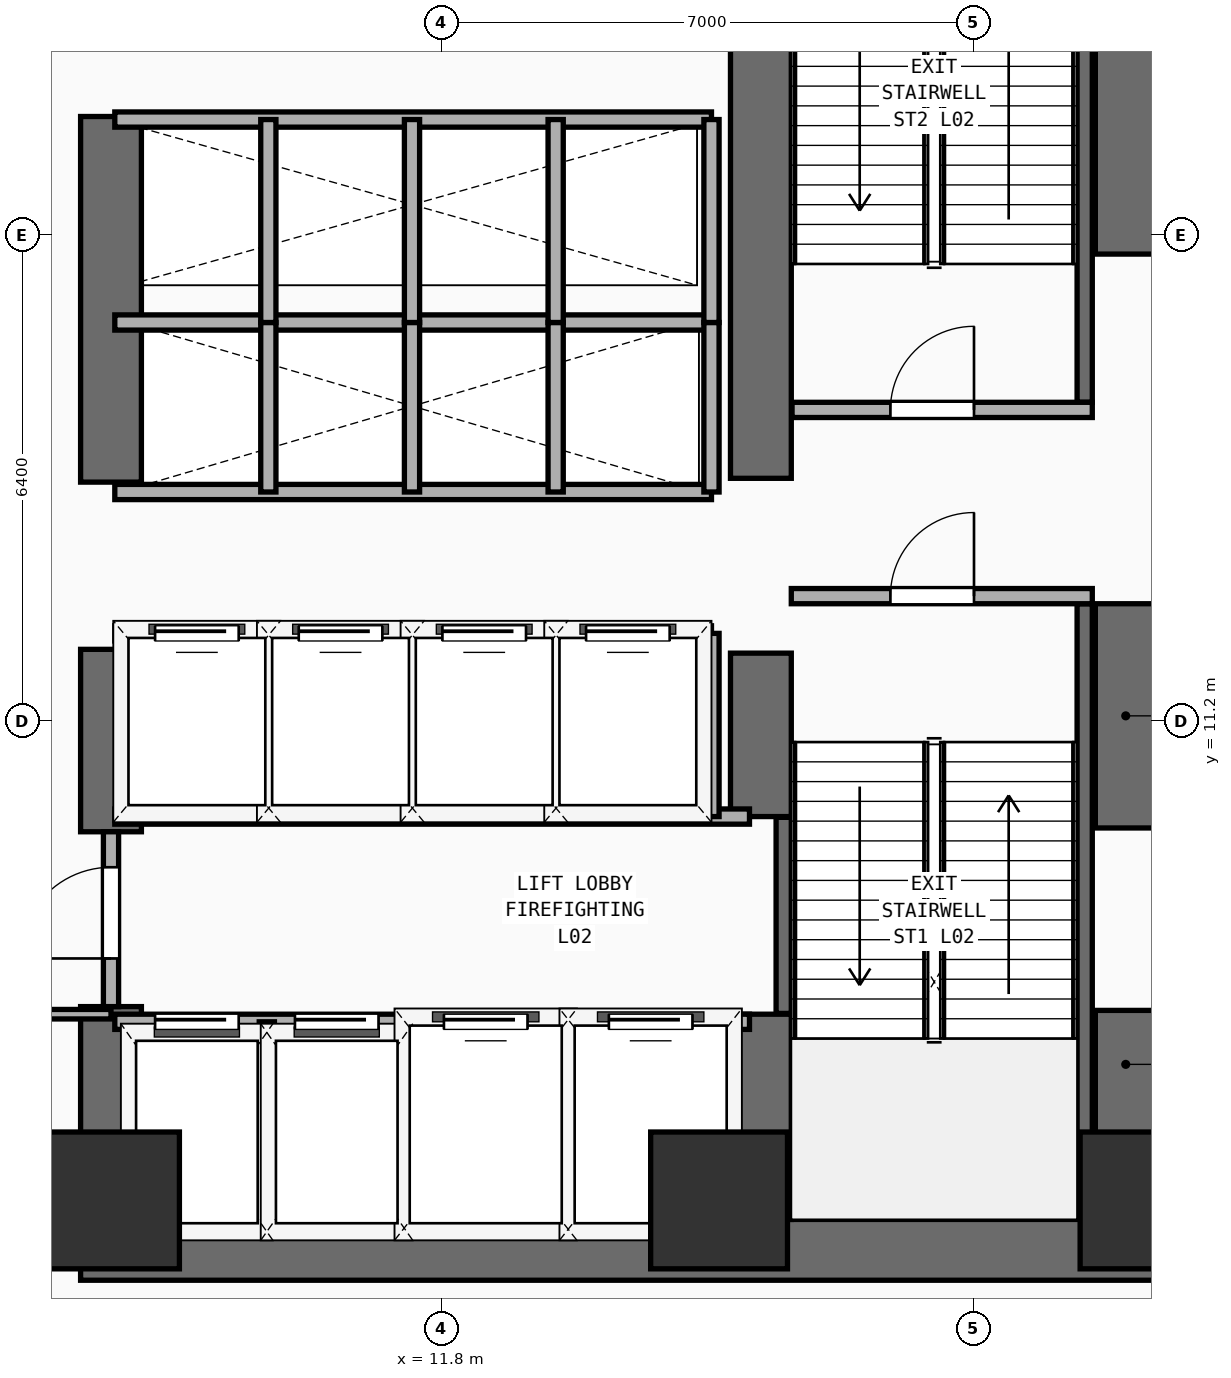
"""IFC4 building model, lengths in metres.
Left out: names, types, materials, properties, quantities, classifications, styles, units other than length and angle.
Written with IfcOpenShell. Run it as: python <this file> out.ifc"""

import sys

from ifc_helpers import new_model, si_unit, direction, frame, frame_2d, origin, origin_2d, place, context, subcontext, project, spatial, rectangle, extrude, element, fill, save


model = new_model("IFC4")
c1 = context("Model", 3, precision=1e-05, world=origin(), true_north=direction((0.0, 1.0)))
c2 = subcontext(c1, "Body", "Model", "MODEL_VIEW")
j1 = project(units=[si_unit("LENGTHUNIT", "METRE"), si_unit("PLANEANGLEUNIT", "RADIAN")], contexts=[c1])
p1 = place(None, origin())
s1 = spatial("IfcSite", under=j1, at=p1, CompositionType="ELEMENT")
p2 = place(p1, origin())
s2 = spatial("IfcBuilding", under=s1, at=p2, CompositionType="ELEMENT")
p3 = place(p2, frame((0.0, 0.0, 5.6)))
s3 = spatial("IfcBuildingStorey", under=s2, at=p3, CompositionType="ELEMENT", Elevation=5.6)
p4 = place(p3, frame((7.05, 4.25, 0.0), z_axis=(0.0, 0.0, 1.0), x_axis=(1.0, 0.0, 0.0)))
e1 = element("IfcWall", 1, at=p4, inside=s3, PredefinedType="SHEAR", context=c2, shape_type="SweptSolid", body=[
    extrude(rectangle(XDim=14.15, YDim=0.8, at=frame_2d((7.075, 0.0))), origin(), (0.0, 0.0, 1.0), 4.46),
])
p5 = place(p3, frame((7.45, 4.65, 0.0), z_axis=(0.0, 0.0, 1.0), x_axis=(0.0, 1.0, 0.0)))
e2 = element("IfcWall", 2, at=p5, inside=s3, PredefinedType="SHEAR", context=c2, shape_type="SweptSolid", body=[
    extrude(rectangle(XDim=2.8, YDim=0.8, at=frame_2d((1.4, 0.0))), origin(), (0.0, 0.0, 1.0), 4.46),
])
p6 = place(p3, frame((7.45, 9.75, 0.0), z_axis=(0.0, 0.0, 1.0), x_axis=(0.0, 1.0, 0.0)))
e3 = element("IfcWall", 3, at=p6, inside=s3, PredefinedType="SHEAR", context=c2, shape_type="SweptSolid", body=[
    extrude(rectangle(XDim=2.4, YDim=0.8, at=frame_2d((1.2, 0.0))), origin(), (0.0, 0.0, 1.0), 4.46),
])
p7 = place(p3, frame((7.45, 14.35, 0.0), z_axis=(0.0, 0.0, 1.0), x_axis=(0.0, 1.0, 0.0)))
e4 = element("IfcWall", 4, at=p7, inside=s3, PredefinedType="SHEAR", context=c2, shape_type="SweptSolid", body=[
    extrude(rectangle(XDim=4.81, YDim=0.8, at=frame_2d((2.405, 0.0))), origin(), (0.0, 0.0, 1.0), 4.46),
])
p8 = place(p3, frame((20.8, 4.65, 0.0), z_axis=(0.0, 0.0, 1.0), x_axis=(0.0, 1.0, 0.0)))
e5 = element("IfcWall", 5, at=p8, inside=s3, PredefinedType="SHEAR", context=c2, shape_type="SweptSolid", body=[
    extrude(rectangle(XDim=2.75, YDim=0.8, at=frame_2d((1.375, 0.0))), origin(), (0.0, 0.0, 1.0), 4.46),
])
p9 = place(p3, frame((20.8, 9.8, 0.0), z_axis=(0.0, 0.0, 1.0), x_axis=(0.0, 1.0, 0.0)))
e6 = element("IfcWall", 6, at=p9, inside=s3, PredefinedType="SHEAR", context=c2, shape_type="SweptSolid", body=[
    extrude(rectangle(XDim=2.95, YDim=0.8, at=frame_2d((1.475, 0.0))), origin(), (0.0, 0.0, 1.0), 4.46),
])
p10 = place(p3, frame((20.8, 17.35, 0.0), z_axis=(0.0, 0.0, 1.0), x_axis=(0.0, 1.0, 0.0)))
e7 = element("IfcWall", 7, at=p10, inside=s3, PredefinedType="SHEAR", context=c2, shape_type="SweptSolid", body=[
    extrude(rectangle(XDim=6.15, YDim=0.8, at=frame_2d((3.075, 0.0))), origin(), (0.0, 0.0, 1.0), 4.46),
])
p11 = place(p3, frame((16.0, 4.65, 0.0), z_axis=(0.0, 0.0, 1.0), x_axis=(0.0, 1.0, 0.0)))
e8 = element("IfcWall", 8, at=p11, inside=s3, PredefinedType="SHEAR", context=c2, shape_type="SweptSolid", body=[
    extrude(rectangle(XDim=2.7, YDim=0.8, at=frame_2d((1.35, 0.0))), origin(), (0.0, 0.0, 1.0), 4.46),
])
p12 = place(p3, frame((16.0, 9.95, 0.0), z_axis=(0.0, 0.0, 1.0), x_axis=(0.0, 1.0, 0.0)))
e9 = element("IfcWall", 9, at=p12, inside=s3, PredefinedType="SHEAR", context=c2, shape_type="SweptSolid", body=[
    extrude(rectangle(XDim=2.15, YDim=0.8, at=frame_2d((1.075, 0.0))), origin(), (0.0, 0.0, 1.0), 4.46),
])
p13 = place(p3, frame((16.0, 14.4, 0.0), z_axis=(0.0, 0.0, 1.0), x_axis=(0.0, 1.0, 0.0)))
e10 = element("IfcWall", 10, at=p13, inside=s3, PredefinedType="SHEAR", context=c2, shape_type="SweptSolid", body=[
    extrude(rectangle(XDim=9.1, YDim=0.8, at=frame_2d((4.55, 0.0))), origin(), (0.0, 0.0, 1.0), 4.46),
])
for number, where, z_axis, x_axis in (
    (11, (7.45, 4.9, 0.0), (0.0, 0.0, 1.0), (1.0, 0.0, 0.0)),
    (12, (15.45, 4.9, 0.0), (0.0, 0.0, 1.0), (1.0, 0.0, 0.0)),
    (13, (21.1, 4.9, 0.0), (0.0, 0.0, 1.0), (1.0, 0.0, 0.0)),
):
    element("IfcColumn", number, at=place(p3, frame(where, z_axis=z_axis, x_axis=x_axis)), inside=s3, PredefinedType="COLUMN", context=c2, shape_type="SweptSolid", body=[
        extrude(rectangle(XDim=1.8, YDim=1.8, at=origin_2d()), origin(), (0.0, 0.0, 1.0), 4.46),
    ])
p14 = place(p3, frame((16.3, 7.36, 0.0), z_axis=(0.0, 0.0, 1.0), x_axis=(0.0, 1.0, 0.0)))
e14 = element("IfcWall", 14, at=p14, inside=s3, PredefinedType="SHEAR", context=c2, shape_type="SweptSolid", body=[
    extrude(rectangle(XDim=2.58, YDim=0.2, at=frame_2d((1.29, 0.0))), origin(), (0.0, 0.0, 1.0), 4.46),
])
p15 = place(p3, frame((20.26, 4.66, 0.0), z_axis=(0.0, 0.0, 1.0), x_axis=(0.0, 1.0, 0.0)))
e15 = element("IfcWall", 15, at=p15, inside=s3, PredefinedType="SHEAR", context=c2, shape_type="SweptSolid", body=[
    extrude(rectangle(XDim=8.09, YDim=0.2, at=frame_2d((4.045, 0.0))), origin(), (0.0, 0.0, 1.0), 4.46),
])
p16 = place(p3, frame((16.4, 12.85, 0.0), z_axis=(0.0, 0.0, 1.0), x_axis=(1.0, 0.0, 0.0)))
e16 = element("IfcWall", 16, at=p16, inside=s3, PredefinedType="PARTITIONING", context=c2, shape_type="SweptSolid", body=[
    extrude(rectangle(XDim=3.96, YDim=0.2, at=frame_2d((1.98, 0.0))), origin(), (0.0, 0.0, 1.0), 4.46),
])
p17 = place(p16, frame((1.304, 0.0, 0.0)))
e17 = element("IfcOpeningElement", 17, at=p17, cuts=e16, PredefinedType="OPENING", context=c2, shape_type="SweptSolid", body=[
    extrude(rectangle(XDim=1.1, YDim=2.2, at=frame_2d((0.55, 1.1))), frame((0.0, 0.11, 0.0), z_axis=(0.0, -1.0, 0.0), x_axis=(1.0, 0.0, 0.0)), (0.0, 0.0, 1.0), 0.22),
])
p18 = place(p3, frame((20.26, 15.4, 0.0), z_axis=(0.0, 0.0, 1.0), x_axis=(0.0, 1.0, 0.0)))
e18 = element("IfcWall", 18, at=p18, inside=s3, PredefinedType="SHEAR", context=c2, shape_type="SweptSolid", body=[
    extrude(rectangle(XDim=8.09, YDim=0.2, at=frame_2d((4.045, 0.0))), origin(), (0.0, 0.0, 1.0), 4.46),
])
p19 = place(p3, frame((16.41, 15.3, 0.0), z_axis=(0.0, 0.0, 1.0), x_axis=(1.0, 0.0, 0.0)))
e19 = element("IfcWall", 19, at=p19, inside=s3, PredefinedType="PARTITIONING", context=c2, shape_type="SweptSolid", body=[
    extrude(rectangle(XDim=3.95, YDim=0.2, at=frame_2d((1.975, 0.0))), origin(), (0.0, 0.0, 1.0), 4.46),
])
p20 = place(p19, frame((1.294, 0.0, 0.0)))
e20 = element("IfcOpeningElement", 20, at=p20, cuts=e19, PredefinedType="OPENING", context=c2, shape_type="SweptSolid", body=[
    extrude(rectangle(XDim=1.1, YDim=2.2, at=frame_2d((0.55, 1.1))), frame((0.0, 0.11, 0.0), z_axis=(0.0, -1.0, 0.0), x_axis=(1.0, 0.0, 0.0)), (0.0, 0.0, 1.0), 0.22),
])
p21 = place(p3, frame((7.5, 7.25, 0.0), z_axis=(0.0, 0.0, 1.0), x_axis=(1.0, 0.0, 0.0)))
e21 = element("IfcWall", 21, at=p21, inside=s3, PredefinedType="PARTITIONING", context=c2, shape_type="SweptSolid", body=[
    extrude(rectangle(XDim=8.35, YDim=0.2, at=frame_2d((4.175, 0.0))), origin(), (0.0, 0.0, 1.0), 4.46),
])
p22 = place(p21, frame((0.53, 0.0, 0.0)))
e22 = element("IfcOpeningElement", 22, at=p22, cuts=e21, PredefinedType="OPENING", context=c2, shape_type="SweptSolid", body=[
    extrude(rectangle(XDim=1.1, YDim=2.2, at=frame_2d((0.55, 1.1))), frame((0.0, 0.11, 0.0), z_axis=(0.0, -1.0, 0.0), x_axis=(1.0, 0.0, 0.0)), (0.0, 0.0, 1.0), 0.22),
])
p23 = place(p21, frame((2.37, 0.0, 0.0)))
e23 = element("IfcOpeningElement", 23, at=p23, cuts=e21, PredefinedType="OPENING", context=c2, shape_type="SweptSolid", body=[
    extrude(rectangle(XDim=1.1, YDim=2.2, at=frame_2d((0.55, 1.1))), frame((0.0, 0.11, 0.0), z_axis=(0.0, -1.0, 0.0), x_axis=(1.0, 0.0, 0.0)), (0.0, 0.0, 1.0), 0.22),
])
p24 = place(p21, frame((4.33, 0.0, 0.0)))
e24 = element("IfcOpeningElement", 24, at=p24, cuts=e21, PredefinedType="OPENING", context=c2, shape_type="SweptSolid", body=[
    extrude(rectangle(XDim=1.1, YDim=2.2, at=frame_2d((0.55, 1.1))), frame((0.0, 0.11, 0.0), z_axis=(0.0, -1.0, 0.0), x_axis=(1.0, 0.0, 0.0)), (0.0, 0.0, 1.0), 0.22),
])
p25 = place(p21, frame((6.5, 0.0, 0.0)))
e25 = element("IfcOpeningElement", 25, at=p25, cuts=e21, PredefinedType="OPENING", context=c2, shape_type="SweptSolid", body=[
    extrude(rectangle(XDim=1.1, YDim=2.2, at=frame_2d((0.55, 1.1))), frame((0.0, 0.11, 0.0), z_axis=(0.0, -1.0, 0.0), x_axis=(1.0, 0.0, 0.0)), (0.0, 0.0, 1.0), 0.22),
])
p26 = place(p3, frame((7.5, 9.95, 0.0), z_axis=(0.0, 0.0, 1.0), x_axis=(1.0, 0.0, 0.0)))
e26 = element("IfcWall", 26, at=p26, inside=s3, PredefinedType="PARTITIONING", context=c2, shape_type="SweptSolid", body=[
    extrude(rectangle(XDim=8.35, YDim=0.2, at=frame_2d((4.175, 0.0))), origin(), (0.0, 0.0, 1.0), 4.46),
])
for number, where, z_axis, x_axis in (
    (27, (9.5, 4.45, 0.0), (0.0, 0.0, 1.0), (0.0, 1.0, 0.0)),
    (28, (11.36, 4.45, 0.0), (0.0, 0.0, 1.0), (0.0, 1.0, 0.0)),
    (29, (13.46, 4.45, 0.0), (0.0, 0.0, 1.0), (0.0, 1.0, 0.0)),
):
    element("IfcWall", number, at=place(p3, frame(where, z_axis=z_axis, x_axis=x_axis)), inside=s3, PredefinedType="PARTITIONING", context=c2, shape_type="SweptSolid", body=[
        extrude(rectangle(XDim=2.8, YDim=0.2, at=frame_2d((1.4, 0.0))), origin(), (0.0, 0.0, 1.0), 4.46),
    ])
p27 = place(p3, frame((7.45, 7.45, 0.0), z_axis=(0.0, 0.0, 1.0), x_axis=(0.0, 1.0, 0.0)))
e30 = element("IfcWall", 30, at=p27, inside=s3, PredefinedType="PARTITIONING", context=c2, shape_type="SweptSolid", body=[
    extrude(rectangle(XDim=2.3, YDim=0.2, at=frame_2d((1.15, 0.0))), origin(), (0.0, 0.0, 1.0), 3.24),
])
p28 = place(p27, frame((0.633, 0.0, 0.0)))
e31 = element("IfcOpeningElement", 31, at=p28, cuts=e30, PredefinedType="OPENING", context=c2, shape_type="SweptSolid", body=[
    extrude(rectangle(XDim=1.2, YDim=2.25, at=frame_2d((0.6, 1.125))), frame((0.0, 0.11, 0.0), z_axis=(0.0, -1.0, 0.0), x_axis=(1.0, 0.0, 0.0)), (0.0, 0.0, 1.0), 0.22),
])
p29 = place(p3, frame((7.5, 12.36, 0.0), z_axis=(0.0, 0.0, 1.0), x_axis=(1.0, 0.0, 0.0)))
e32 = element("IfcWall", 32, at=p29, inside=s3, PredefinedType="PARTITIONING", context=c2, shape_type="SweptSolid", body=[
    extrude(rectangle(XDim=7.85, YDim=0.2, at=frame_2d((3.925, 0.0))), origin(), (0.0, 0.0, 1.0), 4.46),
])
p30 = place(p29, frame((0.53, 0.0, 0.0)))
e33 = element("IfcOpeningElement", 33, at=p30, cuts=e32, PredefinedType="OPENING", context=c2, shape_type="SweptSolid", body=[
    extrude(rectangle(XDim=1.1, YDim=2.2, at=frame_2d((0.55, 1.1))), frame((0.0, 0.11, 0.0), z_axis=(0.0, -1.0, 0.0), x_axis=(1.0, 0.0, 0.0)), (0.0, 0.0, 1.0), 0.22),
])
p31 = place(p29, frame((2.42, 0.0, 0.0)))
e34 = element("IfcOpeningElement", 34, at=p31, cuts=e32, PredefinedType="OPENING", context=c2, shape_type="SweptSolid", body=[
    extrude(rectangle(XDim=1.1, YDim=2.2, at=frame_2d((0.55, 1.1))), frame((0.0, 0.11, 0.0), z_axis=(0.0, -1.0, 0.0), x_axis=(1.0, 0.0, 0.0)), (0.0, 0.0, 1.0), 0.22),
])
p32 = place(p29, frame((4.31, 0.0, 0.0)))
e35 = element("IfcOpeningElement", 35, at=p32, cuts=e32, PredefinedType="OPENING", context=c2, shape_type="SweptSolid", body=[
    extrude(rectangle(XDim=1.1, YDim=2.2, at=frame_2d((0.55, 1.1))), frame((0.0, 0.11, 0.0), z_axis=(0.0, -1.0, 0.0), x_axis=(1.0, 0.0, 0.0)), (0.0, 0.0, 1.0), 0.22),
])
p33 = place(p29, frame((6.2, 0.0, 0.0)))
e36 = element("IfcOpeningElement", 36, at=p33, cuts=e32, PredefinedType="OPENING", context=c2, shape_type="SweptSolid", body=[
    extrude(rectangle(XDim=1.1, YDim=2.2, at=frame_2d((0.55, 1.1))), frame((0.0, 0.11, 0.0), z_axis=(0.0, -1.0, 0.0), x_axis=(1.0, 0.0, 0.0)), (0.0, 0.0, 1.0), 0.22),
])
for number, where, z_axis, x_axis in (
    (37, (15.35, 9.95, 0.0), (0.0, 0.0, 1.0), (0.0, 1.0, 0.0)),
    (38, (9.52, 9.95, 0.0), (0.0, 0.0, 1.0), (0.0, 1.0, 0.0)),
    (39, (11.41, 9.95, 0.0), (0.0, 0.0, 1.0), (0.0, 1.0, 0.0)),
    (40, (13.3, 9.95, 0.0), (0.0, 0.0, 1.0), (0.0, 1.0, 0.0)),
):
    element("IfcWall", number, at=place(p3, frame(where, z_axis=z_axis, x_axis=x_axis)), inside=s3, PredefinedType="PARTITIONING", context=c2, shape_type="SweptSolid", body=[
        extrude(rectangle(XDim=2.41, YDim=0.2, at=frame_2d((1.205, 0.0))), origin(), (0.0, 0.0, 1.0), 4.46),
    ])
for number, where, z_axis, x_axis in (
    (41, (7.5, 14.22, 0.0), (0.0, 0.0, 1.0), (1.0, 0.0, 0.0)),
    (42, (7.5, 16.45, 0.0), (0.0, 0.0, 1.0), (1.0, 0.0, 0.0)),
):
    element("IfcWall", number, at=place(p3, frame(where, z_axis=z_axis, x_axis=x_axis)), inside=s3, PredefinedType="PARTITIONING", context=c2, shape_type="SweptSolid", body=[
        extrude(rectangle(XDim=7.85, YDim=0.2, at=frame_2d((3.925, 0.0))), origin(), (0.0, 0.0, 1.0), 4.46),
    ])
for number, where, z_axis, x_axis in (
    (43, (15.35, 14.22, 0.0), (0.0, 0.0, 1.0), (0.0, 1.0, 0.0)),
    (44, (9.52, 14.22, 0.0), (0.0, 0.0, 1.0), (0.0, 1.0, 0.0)),
    (45, (11.41, 14.22, 0.0), (0.0, 0.0, 1.0), (0.0, 1.0, 0.0)),
    (46, (13.3, 14.22, 0.0), (0.0, 0.0, 1.0), (0.0, 1.0, 0.0)),
):
    element("IfcWall", number, at=place(p3, frame(where, z_axis=z_axis, x_axis=x_axis)), inside=s3, PredefinedType="PARTITIONING", context=c2, shape_type="SweptSolid", body=[
        extrude(rectangle(XDim=2.23, YDim=0.2, at=frame_2d((1.115, 0.0))), origin(), (0.0, 0.0, 1.0), 4.46),
    ])
p34 = place(p3, frame((7.5, 19.12, 0.0), z_axis=(0.0, 0.0, 1.0), x_axis=(1.0, 0.0, 0.0)))
e47 = element("IfcWall", 47, at=p34, inside=s3, PredefinedType="PARTITIONING", context=c2, shape_type="SweptSolid", body=[
    extrude(rectangle(XDim=7.85, YDim=0.2, at=frame_2d((3.925, 0.0))), origin(), (0.0, 0.0, 1.0), 4.46),
])
for number, where, z_axis, x_axis in (
    (48, (15.35, 16.45, 0.0), (0.0, 0.0, 1.0), (0.0, 1.0, 0.0)),
    (49, (9.52, 16.45, 0.0), (0.0, 0.0, 1.0), (0.0, 1.0, 0.0)),
    (50, (11.41, 16.45, 0.0), (0.0, 0.0, 1.0), (0.0, 1.0, 0.0)),
    (51, (13.3, 16.45, 0.0), (0.0, 0.0, 1.0), (0.0, 1.0, 0.0)),
):
    element("IfcWall", number, at=place(p3, frame(where, z_axis=z_axis, x_axis=x_axis)), inside=s3, PredefinedType="PARTITIONING", context=c2, shape_type="SweptSolid", body=[
        extrude(rectangle(XDim=2.67, YDim=0.2, at=frame_2d((1.335, 0.0))), origin(), (0.0, 0.0, 1.0), 4.46),
    ])
p35 = place(p3, frame((0.42, 7.35, 0.0), z_axis=(0.0, 0.0, 1.0), x_axis=(1.0, 0.0, 0.0)))
e52 = element("IfcWall", 52, at=p35, inside=s3, PredefinedType="PARTITIONING", context=c2, shape_type="SweptSolid", body=[
    extrude(rectangle(XDim=7.03, YDim=0.125, at=frame_2d((3.515, 0.0))), origin(), (0.0, 0.0, 1.0), 4.46),
])
p36 = place(p35, frame((4.78, 0.0, 0.0)))
e53 = element("IfcOpeningElement", 53, at=p36, cuts=e52, PredefinedType="OPENING", context=c2, shape_type="SweptSolid", body=[
    extrude(rectangle(XDim=0.95, YDim=2.15, at=frame_2d((0.475, 1.075))), frame((0.0, 0.073, 0.0), z_axis=(0.0, -1.0, 0.0), x_axis=(1.0, 0.0, 0.0)), (0.0, 0.0, 1.0), 0.145),
])
p37 = place(p17, frame((1.1, 0.0, 0.0), z_axis=(0.0, 0.0, 1.0), x_axis=(-1.0, 0.0, 0.0)))
e54 = element("IfcDoor", 54, at=p37, inside=s3, OperationType="SINGLE_SWING_LEFT", PredefinedType="DOOR", context=c2, shape_type="SweptSolid", body=[
    extrude(rectangle(XDim=1.1, YDim=2.2, at=frame_2d((0.55, 1.1))), frame((0.0, 0.025, 0.0), z_axis=(0.0, -1.0, 0.0), x_axis=(1.0, 0.0, 0.0)), (0.0, 0.0, 1.0), 0.05),
])
fill(e17, e54)
p38 = place(p20, origin())
e55 = element("IfcDoor", 55, at=p38, inside=s3, OperationType="SINGLE_SWING_RIGHT", PredefinedType="DOOR", context=c2, shape_type="SweptSolid", body=[
    extrude(rectangle(XDim=1.1, YDim=2.2, at=frame_2d((0.55, 1.1))), frame((0.0, 0.025, 0.0), z_axis=(0.0, -1.0, 0.0), x_axis=(1.0, 0.0, 0.0)), (0.0, 0.0, 1.0), 0.05),
])
fill(e20, e55)
p39 = place(p22, origin())
e56 = element("IfcDoor", 56, at=p39, inside=s3, OperationType="SLIDING_TO_LEFT", PredefinedType="DOOR", context=c2, shape_type="SweptSolid", body=[
    extrude(rectangle(XDim=1.1, YDim=2.2, at=frame_2d((0.55, 1.1))), frame((0.0, 0.025, 0.0), z_axis=(0.0, -1.0, 0.0), x_axis=(1.0, 0.0, 0.0)), (0.0, 0.0, 1.0), 0.05),
])
fill(e22, e56)
p40 = place(p23, origin())
e57 = element("IfcDoor", 57, at=p40, inside=s3, OperationType="SLIDING_TO_LEFT", PredefinedType="DOOR", context=c2, shape_type="SweptSolid", body=[
    extrude(rectangle(XDim=1.1, YDim=2.2, at=frame_2d((0.55, 1.1))), frame((0.0, 0.025, 0.0), z_axis=(0.0, -1.0, 0.0), x_axis=(1.0, 0.0, 0.0)), (0.0, 0.0, 1.0), 0.05),
])
fill(e23, e57)
p41 = place(p24, origin())
e58 = element("IfcDoor", 58, at=p41, inside=s3, OperationType="SLIDING_TO_LEFT", PredefinedType="DOOR", context=c2, shape_type="SweptSolid", body=[
    extrude(rectangle(XDim=1.1, YDim=2.2, at=frame_2d((0.55, 1.1))), frame((0.0, 0.025, 0.0), z_axis=(0.0, -1.0, 0.0), x_axis=(1.0, 0.0, 0.0)), (0.0, 0.0, 1.0), 0.05),
])
fill(e24, e58)
p42 = place(p25, origin())
e59 = element("IfcDoor", 59, at=p42, inside=s3, OperationType="SLIDING_TO_LEFT", PredefinedType="DOOR", context=c2, shape_type="SweptSolid", body=[
    extrude(rectangle(XDim=1.1, YDim=2.2, at=frame_2d((0.55, 1.1))), frame((0.0, 0.025, 0.0), z_axis=(0.0, -1.0, 0.0), x_axis=(1.0, 0.0, 0.0)), (0.0, 0.0, 1.0), 0.05),
])
fill(e25, e59)
p43 = place(p28, frame((1.2, 0.0, 0.0), z_axis=(0.0, 0.0, 1.0), x_axis=(-1.0, 0.0, 0.0)))
e60 = element("IfcDoor", 60, at=p43, inside=s3, OperationType="SINGLE_SWING_RIGHT", PredefinedType="DOOR", context=c2, shape_type="SweptSolid", body=[
    extrude(rectangle(XDim=1.2, YDim=2.25, at=frame_2d((0.6, 1.125))), frame((0.0, 0.025, 0.0), z_axis=(0.0, -1.0, 0.0), x_axis=(1.0, 0.0, 0.0)), (0.0, 0.0, 1.0), 0.05),
])
fill(e31, e60)
p44 = place(p30, origin())
e61 = element("IfcDoor", 61, at=p44, inside=s3, OperationType="SLIDING_TO_LEFT", PredefinedType="DOOR", context=c2, shape_type="SweptSolid", body=[
    extrude(rectangle(XDim=1.1, YDim=2.2, at=frame_2d((0.55, 1.1))), frame((0.0, 0.025, 0.0), z_axis=(0.0, -1.0, 0.0), x_axis=(1.0, 0.0, 0.0)), (0.0, 0.0, 1.0), 0.05),
])
fill(e33, e61)
p45 = place(p31, origin())
e62 = element("IfcDoor", 62, at=p45, inside=s3, OperationType="SLIDING_TO_LEFT", PredefinedType="DOOR", context=c2, shape_type="SweptSolid", body=[
    extrude(rectangle(XDim=1.1, YDim=2.2, at=frame_2d((0.55, 1.1))), frame((0.0, 0.025, 0.0), z_axis=(0.0, -1.0, 0.0), x_axis=(1.0, 0.0, 0.0)), (0.0, 0.0, 1.0), 0.05),
])
fill(e34, e62)
p46 = place(p32, origin())
e63 = element("IfcDoor", 63, at=p46, inside=s3, OperationType="SLIDING_TO_LEFT", PredefinedType="DOOR", context=c2, shape_type="SweptSolid", body=[
    extrude(rectangle(XDim=1.1, YDim=2.2, at=frame_2d((0.55, 1.1))), frame((0.0, 0.025, 0.0), z_axis=(0.0, -1.0, 0.0), x_axis=(1.0, 0.0, 0.0)), (0.0, 0.0, 1.0), 0.05),
])
fill(e35, e63)
p47 = place(p33, origin())
e64 = element("IfcDoor", 64, at=p47, inside=s3, OperationType="SLIDING_TO_LEFT", PredefinedType="DOOR", context=c2, shape_type="SweptSolid", body=[
    extrude(rectangle(XDim=1.1, YDim=2.2, at=frame_2d((0.55, 1.1))), frame((0.0, 0.025, 0.0), z_axis=(0.0, -1.0, 0.0), x_axis=(1.0, 0.0, 0.0)), (0.0, 0.0, 1.0), 0.05),
])
fill(e36, e64)
save(model, sys.argv[1])
